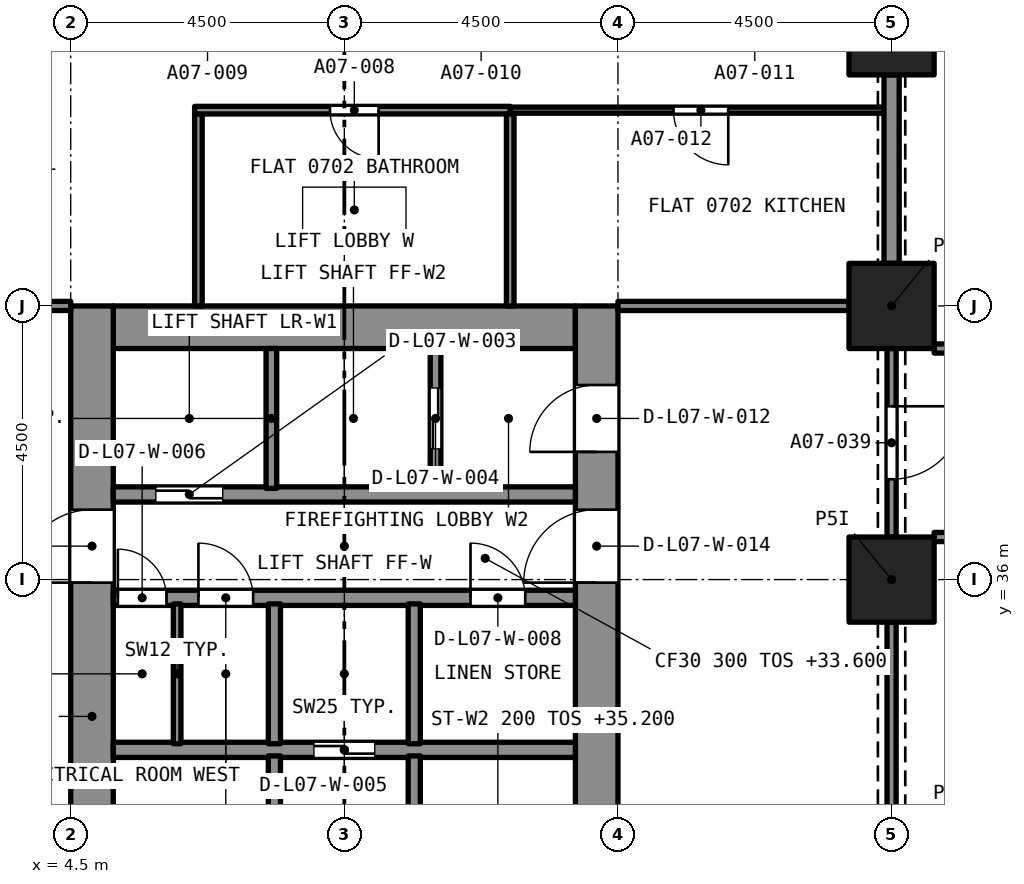
"""IFC4 building model, lengths in metres.
Left out: names, types, materials, properties, quantities, classifications, styles, units other than length and angle.
Written with IfcOpenShell. Run it as: python <this file> out.ifc"""

import sys

from ifc_helpers import new_model, si_unit, direction, frame, frame_2d, origin, origin_2d, place, context, subcontext, project, spatial, rectangle, extrude, element, fill, save


model = new_model("IFC4")
c1 = context("Model", 3, precision=1e-05, world=origin(), true_north=direction((0.0, 1.0)))
c2 = subcontext(c1, "Body", "Model", "MODEL_VIEW")
j1 = project(units=[si_unit("LENGTHUNIT", "METRE"), si_unit("PLANEANGLEUNIT", "RADIAN")], contexts=[c1])
p1 = place(None, origin())
s1 = spatial("IfcSite", under=j1, at=p1, CompositionType="ELEMENT")
p2 = place(p1, origin())
s2 = spatial("IfcBuilding", under=s1, at=p2, CompositionType="ELEMENT")
p3 = place(p2, frame((0.0, 0.0, 33.6)))
s3 = spatial("IfcBuildingStorey", under=s2, at=p3, CompositionType="ELEMENT", Elevation=33.6)
for number, where, z_axis, x_axis in (
    (1, (18.0, 36.0, 0.0), (0.0, 0.0, 1.0), (1.0, 0.0, 0.0)),
    (2, (18.0, 40.5, 0.0), (0.0, 0.0, 1.0), (1.0, 0.0, 0.0)),
    (3, (18.0, 45.0, 0.0), (0.0, 0.0, 1.0), (1.0, 0.0, 0.0)),
):
    element("IfcColumn", number, at=place(p3, frame(where, z_axis=z_axis, x_axis=x_axis)), inside=s3, PredefinedType="COLUMN", context=c2, shape_type="SweptSolid", body=[
        extrude(rectangle(XDim=1.4, YDim=1.4, at=origin_2d()), origin(), (0.0, 0.0, 1.0), 3.2),
    ])
p4 = place(p3, frame((5.2, 40.15, 0.0), z_axis=(0.0, 0.0, 1.0), x_axis=(1.0, 0.0, 0.0)))
e4 = element("IfcWall", 4, at=p4, inside=s3, PredefinedType="SOLIDWALL", context=c2, shape_type="SweptSolid", body=[
    extrude(rectangle(XDim=7.6, YDim=0.7, at=frame_2d((3.8, 0.0))), origin(), (0.0, 0.0, 1.0), 3.2),
])
p5 = place(p3, frame((4.85, 27.0, 0.0), z_axis=(0.0, 0.0, 1.0), x_axis=(0.0, 1.0, 0.0)))
e5 = element("IfcWall", 5, at=p5, inside=s3, PredefinedType="SOLIDWALL", context=c2, shape_type="SweptSolid", body=[
    extrude(rectangle(XDim=13.5, YDim=0.7, at=frame_2d((6.75, 0.0))), origin(), (0.0, 0.0, 1.0), 3.2),
])
p6 = place(p5, frame((8.95, 0.0, 0.0)))
e6 = element("IfcOpeningElement", 6, at=p6, cuts=e5, PredefinedType="OPENING", context=c2, shape_type="SweptSolid", body=[
    extrude(rectangle(XDim=1.2, YDim=2.1, at=frame_2d((0.6, 1.05))), frame((0.0, 0.36, 0.0), z_axis=(0.0, -1.0, 0.0), x_axis=(1.0, 0.0, 0.0)), (0.0, 0.0, 1.0), 0.72),
])
p7 = place(p3, frame((13.15, 27.0, 0.0), z_axis=(0.0, 0.0, 1.0), x_axis=(0.0, 1.0, 0.0)))
e7 = element("IfcWall", 7, at=p7, inside=s3, PredefinedType="SOLIDWALL", context=c2, shape_type="SweptSolid", body=[
    extrude(rectangle(XDim=13.5, YDim=0.7, at=frame_2d((6.75, 0.0))), origin(), (0.0, 0.0, 1.0), 3.2),
])
p8 = place(p7, frame((11.1, 0.0, 0.0)))
e8 = element("IfcOpeningElement", 8, at=p8, cuts=e7, PredefinedType="OPENING", context=c2, shape_type="SweptSolid", body=[
    extrude(rectangle(XDim=1.1, YDim=2.1, at=frame_2d((0.55, 1.05))), frame((0.0, 0.36, 0.0), z_axis=(0.0, -1.0, 0.0), x_axis=(1.0, 0.0, 0.0)), (0.0, 0.0, 1.0), 0.72),
])
p9 = place(p7, frame((8.95, 0.0, 0.0)))
e9 = element("IfcOpeningElement", 9, at=p9, cuts=e7, PredefinedType="OPENING", context=c2, shape_type="SweptSolid", body=[
    extrude(rectangle(XDim=1.2, YDim=2.1, at=frame_2d((0.6, 1.05))), frame((0.0, 0.36, 0.0), z_axis=(0.0, -1.0, 0.0), x_axis=(1.0, 0.0, 0.0)), (0.0, 0.0, 1.0), 0.72),
])
p10 = place(p3, frame((6.6, 40.5, 0.0), z_axis=(0.0, 0.0, 1.0), x_axis=(0.0, 1.0, 0.0)))
e10 = element("IfcWall", 10, at=p10, inside=s3, PredefinedType="PARTITIONING", context=c2, shape_type="SweptSolid", body=[
    extrude(rectangle(XDim=3.157, YDim=0.125, at=frame_2d((1.579, 0.0))), origin(), (0.0, 0.0, 1.0), 2.9),
])
p11 = place(p3, frame((11.728, 43.72, 0.0), z_axis=(0.0, 0.0, 1.0), x_axis=(-1.0, 0.0, 0.0)))
e11 = element("IfcWall", 11, at=p11, inside=s3, PredefinedType="PARTITIONING", context=c2, shape_type="SweptSolid", body=[
    extrude(rectangle(XDim=5.19, YDim=0.125, at=frame_2d((2.595, 0.0))), origin(), (0.0, 0.0, 1.0), 2.9),
])
p12 = place(p11, frame((2.164, 0.0, 0.0)))
e12 = element("IfcOpeningElement", 12, at=p12, cuts=e11, PredefinedType="OPENING", context=c2, shape_type="SweptSolid", body=[
    extrude(rectangle(XDim=0.8, YDim=2.1, at=frame_2d((0.4, 1.05))), frame((0.0, 0.073, 0.0), z_axis=(0.0, -1.0, 0.0), x_axis=(1.0, 0.0, 0.0)), (0.0, 0.0, 1.0), 0.145),
])
p13 = place(p3, frame((11.728, 40.5, 0.0), z_axis=(0.0, 0.0, 1.0), x_axis=(0.0, 1.0, 0.0)))
e13 = element("IfcWall", 13, at=p13, inside=s3, PredefinedType="PARTITIONING", context=c2, shape_type="SweptSolid", body=[
    extrude(rectangle(XDim=3.157, YDim=0.125, at=frame_2d((1.579, 0.0))), origin(), (0.0, 0.0, 1.0), 2.9),
])
p14 = place(p3, frame((17.875, 43.72, 0.0), z_axis=(0.0, 0.0, 1.0), x_axis=(-1.0, 0.0, 0.0)))
e14 = element("IfcWall", 14, at=p14, inside=s3, PredefinedType="PARTITIONING", context=c2, shape_type="SweptSolid", body=[
    extrude(rectangle(XDim=6.147, YDim=0.1, at=frame_2d((3.073, 0.0))), origin(), (0.0, 0.0, 1.0), 2.9),
])
p15 = place(p14, frame((2.561, 0.0, 0.0)))
e15 = element("IfcOpeningElement", 15, at=p15, cuts=e14, PredefinedType="OPENING", context=c2, shape_type="SweptSolid", body=[
    extrude(rectangle(XDim=0.9, YDim=2.1, at=frame_2d((0.45, 1.05))), frame((0.0, 0.06, 0.0), z_axis=(0.0, -1.0, 0.0), x_axis=(1.0, 0.0, 0.0)), (0.0, 0.0, 1.0), 0.12),
])
p16 = place(p3, frame((0.7, 40.5, 0.0), z_axis=(0.0, 0.0, 1.0), x_axis=(1.0, 0.0, 0.0)))
e16 = element("IfcWall", 16, at=p16, inside=s3, PredefinedType="PARTITIONING", context=c2, shape_type="SweptSolid", body=[
    extrude(rectangle(XDim=3.8, YDim=0.15, at=frame_2d((1.9, 0.0))), origin(), (0.0, 0.0, 1.0), 2.9),
])
p17 = place(p16, frame((1.05, 0.0, 0.0)))
e17 = element("IfcOpeningElement", 17, at=p17, cuts=e16, PredefinedType="OPENING", context=c2, shape_type="SweptSolid", body=[
    extrude(rectangle(XDim=1.0, YDim=2.1, at=frame_2d((0.5, 1.05))), frame((0.0, 0.085, 0.0), z_axis=(0.0, -1.0, 0.0), x_axis=(1.0, 0.0, 0.0)), (0.0, 0.0, 1.0), 0.17),
])
p18 = place(p3, frame((18.0, 41.2, 0.0), z_axis=(0.0, 0.0, 1.0), x_axis=(0.0, 1.0, 0.0)))
e18 = element("IfcWall", 18, at=p18, inside=s3, PredefinedType="PARTITIONING", context=c2, shape_type="SweptSolid", body=[
    extrude(rectangle(XDim=3.1, YDim=0.25, at=frame_2d((1.55, 0.0))), origin(), (0.0, 0.0, 1.0), 2.38),
])
p19 = place(p3, frame((13.5, 40.5, 0.0), z_axis=(0.0, 0.0, 1.0), x_axis=(1.0, 0.0, 0.0)))
e19 = element("IfcWall", 19, at=p19, inside=s3, PredefinedType="PARTITIONING", context=c2, shape_type="SweptSolid", body=[
    extrude(rectangle(XDim=3.8, YDim=0.15, at=frame_2d((1.9, 0.0))), origin(), (0.0, 0.0, 1.0), 2.9),
])
p20 = place(p3, frame((18.7, 39.8, 0.0), z_axis=(0.0, 0.0, 1.0), x_axis=(1.0, 0.0, 0.0)))
e20 = element("IfcWall", 20, at=p20, inside=s3, PredefinedType="PARTITIONING", context=c2, shape_type="SweptSolid", body=[
    extrude(rectangle(XDim=12.1, YDim=0.15, at=frame_2d((6.05, 0.0))), origin(), (0.0, 0.0, 1.0), 2.75),
])
p21 = place(p20, frame((5.55, 0.0, 0.0)))
e21 = element("IfcOpeningElement", 21, at=p21, cuts=e20, PredefinedType="OPENING", context=c2, shape_type="SweptSolid", body=[
    extrude(rectangle(XDim=1.0, YDim=2.1, at=frame_2d((0.5, 1.05))), frame((0.0, 0.085, 0.0), z_axis=(0.0, -1.0, 0.0), x_axis=(1.0, 0.0, 0.0)), (0.0, 0.0, 1.0), 0.17),
])
p22 = place(p3, frame((24.75, 36.7, 0.0), z_axis=(0.0, 0.0, 1.0), x_axis=(-1.0, 0.0, 0.0)))
e22 = element("IfcWall", 22, at=p22, inside=s3, PredefinedType="PARTITIONING", context=c2, shape_type="SweptSolid", body=[
    extrude(rectangle(XDim=6.05, YDim=0.15, at=frame_2d((3.025, 0.0))), origin(), (0.0, 0.0, 1.0), 2.75),
])
p23 = place(p22, frame((2.875, 0.0, 0.0)))
e23 = element("IfcOpeningElement", 23, at=p23, cuts=e22, PredefinedType="OPENING", context=c2, shape_type="SweptSolid", body=[
    extrude(rectangle(XDim=1.0, YDim=2.1, at=frame_2d((0.5, 1.05))), frame((0.0, 0.085, 0.0), z_axis=(0.0, -1.0, 0.0), x_axis=(1.0, 0.0, 0.0)), (0.0, 0.0, 1.0), 0.17),
])
p24 = place(p3, frame((18.0, 39.8, 0.0), z_axis=(0.0, 0.0, 1.0), x_axis=(0.0, -1.0, 0.0)))
e24 = element("IfcWall", 24, at=p24, inside=s3, PredefinedType="PARTITIONING", context=c2, shape_type="SweptSolid", body=[
    extrude(rectangle(XDim=3.1, YDim=0.15, at=frame_2d((1.55, 0.0))), origin(), (0.0, 0.0, 1.0), 2.38),
])
p25 = place(p24, frame((0.95, 0.0, 0.0)))
e25 = element("IfcOpeningElement", 25, at=p25, cuts=e24, PredefinedType="OPENING", context=c2, shape_type="SweptSolid", body=[
    extrude(rectangle(XDim=1.2, YDim=2.1, at=frame_2d((0.6, 1.05))), frame((0.0, 0.085, 0.0), z_axis=(0.0, -1.0, 0.0), x_axis=(1.0, 0.0, 0.0)), (0.0, 0.0, 1.0), 0.17),
])
p26 = place(p3, frame((18.0, 32.2, 0.0), z_axis=(0.0, 0.0, 1.0), x_axis=(0.0, 1.0, 0.0)))
e26 = element("IfcWall", 26, at=p26, inside=s3, PredefinedType="PARTITIONING", context=c2, shape_type="SweptSolid", body=[
    extrude(rectangle(XDim=3.1, YDim=0.15, at=frame_2d((1.55, 0.0))), origin(), (0.0, 0.0, 1.0), 2.38),
])
p27 = place(p3, frame((5.2, 33.2, 0.0), z_axis=(0.0, 0.0, 1.0), x_axis=(1.0, 0.0, 0.0)))
e27 = element("IfcWall", 27, at=p27, inside=s3, PredefinedType="SOLIDWALL", context=c2, shape_type="SweptSolid", body=[
    extrude(rectangle(XDim=7.6, YDim=0.25, at=frame_2d((3.8, 0.0))), origin(), (0.0, 0.0, 1.0), 2.9),
])
p28 = place(p27, frame((3.3, 0.0, 0.0)))
e28 = element("IfcOpeningElement", 28, at=p28, cuts=e27, PredefinedType="OPENING", context=c2, shape_type="SweptSolid", body=[
    extrude(rectangle(XDim=1.0, YDim=2.1, at=frame_2d((0.5, 1.05))), frame((0.0, 0.135, 0.0), z_axis=(0.0, -1.0, 0.0), x_axis=(1.0, 0.0, 0.0)), (0.0, 0.0, 1.0), 0.27),
])
p29 = place(p3, frame((5.2, 35.7, 0.0), z_axis=(0.0, 0.0, 1.0), x_axis=(1.0, 0.0, 0.0)))
e29 = element("IfcWall", 29, at=p29, inside=s3, PredefinedType="SOLIDWALL", context=c2, shape_type="SweptSolid", body=[
    extrude(rectangle(XDim=7.6, YDim=0.25, at=frame_2d((3.8, 0.0))), origin(), (0.0, 0.0, 1.0), 2.9),
])
p30 = place(p29, frame((0.075, 0.0, 0.0)))
e30 = element("IfcOpeningElement", 30, at=p30, cuts=e29, PredefinedType="OPENING", context=c2, shape_type="SweptSolid", body=[
    extrude(rectangle(XDim=0.8, YDim=2.1, at=frame_2d((0.4, 1.05))), frame((0.0, 0.135, 0.0), z_axis=(0.0, -1.0, 0.0), x_axis=(1.0, 0.0, 0.0)), (0.0, 0.0, 1.0), 0.27),
])
p31 = place(p29, frame((1.4, 0.0, 0.0)))
e31 = element("IfcOpeningElement", 31, at=p31, cuts=e29, PredefinedType="OPENING", context=c2, shape_type="SweptSolid", body=[
    extrude(rectangle(XDim=0.9, YDim=2.1, at=frame_2d((0.45, 1.05))), frame((0.0, 0.135, 0.0), z_axis=(0.0, -1.0, 0.0), x_axis=(1.0, 0.0, 0.0)), (0.0, 0.0, 1.0), 0.27),
])
p32 = place(p29, frame((5.875, 0.0, 0.0)))
e32 = element("IfcOpeningElement", 32, at=p32, cuts=e29, PredefinedType="OPENING", context=c2, shape_type="SweptSolid", body=[
    extrude(rectangle(XDim=0.9, YDim=2.1, at=frame_2d((0.45, 1.05))), frame((0.0, 0.135, 0.0), z_axis=(0.0, -1.0, 0.0), x_axis=(1.0, 0.0, 0.0)), (0.0, 0.0, 1.0), 0.27),
])
p33 = place(p3, frame((5.2, 37.4, 0.0), z_axis=(0.0, 0.0, 1.0), x_axis=(1.0, 0.0, 0.0)))
e33 = element("IfcWall", 33, at=p33, inside=s3, PredefinedType="SOLIDWALL", context=c2, shape_type="SweptSolid", body=[
    extrude(rectangle(XDim=7.6, YDim=0.25, at=frame_2d((3.8, 0.0))), origin(), (0.0, 0.0, 1.0), 2.9),
])
p34 = place(p33, frame((0.7, 0.0, 0.0)))
e34 = element("IfcOpeningElement", 34, at=p34, cuts=e33, PredefinedType="OPENING", context=c2, shape_type="SweptSolid", body=[
    extrude(rectangle(XDim=1.1, YDim=2.4, at=frame_2d((0.55, 1.2))), frame((0.0, 0.135, 0.0), z_axis=(0.0, -1.0, 0.0), x_axis=(1.0, 0.0, 0.0)), (0.0, 0.0, 1.0), 0.27),
])
p35 = place(p3, frame((7.85, 27.7, 0.0), z_axis=(0.0, 0.0, 1.0), x_axis=(0.0, 1.0, 0.0)))
e35 = element("IfcWall", 35, at=p35, inside=s3, PredefinedType="SOLIDWALL", context=c2, shape_type="SweptSolid", body=[
    extrude(rectangle(XDim=5.4, YDim=0.2, at=frame_2d((2.7, 0.0))), origin(), (0.0, 0.0, 1.0), 2.9),
])
p36 = place(p35, frame((0.2, 0.0, 0.0)))
e36 = element("IfcOpeningElement", 36, at=p36, cuts=e35, PredefinedType="OPENING", context=c2, shape_type="SweptSolid", body=[
    extrude(rectangle(XDim=0.9, YDim=2.1, at=frame_2d((0.45, 1.05))), frame((0.0, 0.11, 0.0), z_axis=(0.0, -1.0, 0.0), x_axis=(1.0, 0.0, 0.0)), (0.0, 0.0, 1.0), 0.22),
])
p37 = place(p3, frame((10.15, 27.7, 0.0), z_axis=(0.0, 0.0, 1.0), x_axis=(0.0, 1.0, 0.0)))
e37 = element("IfcWall", 37, at=p37, inside=s3, PredefinedType="SOLIDWALL", context=c2, shape_type="SweptSolid", body=[
    extrude(rectangle(XDim=5.4, YDim=0.2, at=frame_2d((2.7, 0.0))), origin(), (0.0, 0.0, 1.0), 2.9),
])
p38 = place(p37, frame((0.2, 0.0, 0.0)))
e38 = element("IfcOpeningElement", 38, at=p38, cuts=e37, PredefinedType="OPENING", context=c2, shape_type="SweptSolid", body=[
    extrude(rectangle(XDim=0.9, YDim=2.1, at=frame_2d((0.45, 1.05))), frame((0.0, 0.11, 0.0), z_axis=(0.0, -1.0, 0.0), x_axis=(1.0, 0.0, 0.0)), (0.0, 0.0, 1.0), 0.22),
])
for number, where, z_axis, x_axis in (
    (39, (7.85, 33.3, 0.0), (0.0, 0.0, 1.0), (0.0, 1.0, 0.0)),
    (40, (10.15, 33.3, 0.0), (0.0, 0.0, 1.0), (0.0, 1.0, 0.0)),
):
    element("IfcWall", number, at=place(p3, frame(where, z_axis=z_axis, x_axis=x_axis)), inside=s3, PredefinedType="SOLIDWALL", context=c2, shape_type="SweptSolid", body=[
        extrude(rectangle(XDim=2.3, YDim=0.2, at=frame_2d((1.15, 0.0))), origin(), (0.0, 0.0, 1.0), 2.9),
    ])
p39 = place(p3, frame((7.8, 37.5, 0.0), z_axis=(0.0, 0.0, 1.0), x_axis=(0.0, 1.0, 0.0)))
e41 = element("IfcWall", 41, at=p39, inside=s3, PredefinedType="SOLIDWALL", context=c2, shape_type="SweptSolid", body=[
    extrude(rectangle(XDim=2.3, YDim=0.175, at=frame_2d((1.15, 0.0))), origin(), (0.0, 0.0, 1.0), 2.9),
])
p40 = place(p3, frame((10.5, 37.5, 0.0), z_axis=(0.0, 0.0, 1.0), x_axis=(0.0, 1.0, 0.0)))
e42 = element("IfcWall", 42, at=p40, inside=s3, PredefinedType="SOLIDWALL", context=c2, shape_type="SweptSolid", body=[
    extrude(rectangle(XDim=2.3, YDim=0.175, at=frame_2d((1.15, 0.0))), origin(), (0.0, 0.0, 1.0), 2.9),
])
p41 = place(p40, frame((0.65, 0.0, 0.0)))
e43 = element("IfcOpeningElement", 43, at=p41, cuts=e42, PredefinedType="OPENING", context=c2, shape_type="SweptSolid", body=[
    extrude(rectangle(XDim=1.0, YDim=2.1, at=frame_2d((0.5, 1.05))), frame((0.0, 0.097, 0.0), z_axis=(0.0, -1.0, 0.0), x_axis=(1.0, 0.0, 0.0)), (0.0, 0.0, 1.0), 0.195),
])
p42 = place(p3, frame((6.25, 33.3, 0.0), z_axis=(0.0, 0.0, 1.0), x_axis=(0.0, 1.0, 0.0)))
e44 = element("IfcWall", 44, at=p42, inside=s3, PredefinedType="PARTITIONING", context=c2, shape_type="SweptSolid", body=[
    extrude(rectangle(XDim=2.3, YDim=0.125, at=frame_2d((1.15, 0.0))), origin(), (0.0, 0.0, 1.0), 2.9),
])
p43 = place(p12, origin())
e45 = element("IfcDoor", 45, at=p43, inside=s3, OperationType="SINGLE_SWING_LEFT", PredefinedType="DOOR", context=c2, shape_type="SweptSolid", body=[
    extrude(rectangle(XDim=0.8, YDim=2.1, at=frame_2d((0.4, 1.05))), frame((0.0, 0.025, 0.0), z_axis=(0.0, -1.0, 0.0), x_axis=(1.0, 0.0, 0.0)), (0.0, 0.0, 1.0), 0.05),
])
fill(e12, e45)
p44 = place(p15, origin())
e46 = element("IfcDoor", 46, at=p44, inside=s3, OperationType="SINGLE_SWING_LEFT", PredefinedType="DOOR", context=c2, shape_type="SweptSolid", body=[
    extrude(rectangle(XDim=0.9, YDim=2.1, at=frame_2d((0.45, 1.05))), frame((0.0, 0.025, 0.0), z_axis=(0.0, -1.0, 0.0), x_axis=(1.0, 0.0, 0.0)), (0.0, 0.0, 1.0), 0.05),
])
fill(e15, e46)
p45 = place(p25, origin())
e47 = element("IfcDoor", 47, at=p45, inside=s3, OperationType="SINGLE_SWING_LEFT", PredefinedType="DOOR", context=c2, shape_type="SweptSolid", body=[
    extrude(rectangle(XDim=1.2, YDim=2.1, at=frame_2d((0.6, 1.05))), frame((0.0, 0.025, 0.0), z_axis=(0.0, -1.0, 0.0), x_axis=(1.0, 0.0, 0.0)), (0.0, 0.0, 1.0), 0.05),
])
fill(e25, e47)
p46 = place(p34, origin())
e48 = element("IfcDoor", 48, at=p46, inside=s3, OperationType="SLIDING_TO_LEFT", PredefinedType="DOOR", context=c2, shape_type="SweptSolid", body=[
    extrude(rectangle(XDim=1.1, YDim=2.4, at=frame_2d((0.55, 1.2))), frame((0.0, 0.025, 0.0), z_axis=(0.0, -1.0, 0.0), x_axis=(1.0, 0.0, 0.0)), (0.0, 0.0, 1.0), 0.05),
])
fill(e34, e48)
p47 = place(p41, origin())
e49 = element("IfcDoor", 49, at=p47, inside=s3, OperationType="SLIDING_TO_LEFT", PredefinedType="DOOR", context=c2, shape_type="SweptSolid", body=[
    extrude(rectangle(XDim=1.0, YDim=2.1, at=frame_2d((0.5, 1.05))), frame((0.0, 0.025, 0.0), z_axis=(0.0, -1.0, 0.0), x_axis=(1.0, 0.0, 0.0)), (0.0, 0.0, 1.0), 0.05),
])
fill(e43, e49)
p48 = place(p28, origin())
e50 = element("IfcDoor", 50, at=p48, inside=s3, OperationType="SLIDING_TO_LEFT", PredefinedType="DOOR", context=c2, shape_type="SweptSolid", body=[
    extrude(rectangle(XDim=1.0, YDim=2.1, at=frame_2d((0.5, 1.05))), frame((0.0, 0.025, 0.0), z_axis=(0.0, -1.0, 0.0), x_axis=(1.0, 0.0, 0.0)), (0.0, 0.0, 1.0), 0.05),
])
fill(e28, e50)
p49 = place(p30, origin())
e51 = element("IfcDoor", 51, at=p49, inside=s3, OperationType="SINGLE_SWING_LEFT", PredefinedType="DOOR", context=c2, shape_type="SweptSolid", body=[
    extrude(rectangle(XDim=0.8, YDim=2.1, at=frame_2d((0.4, 1.05))), frame((0.0, 0.025, 0.0), z_axis=(0.0, -1.0, 0.0), x_axis=(1.0, 0.0, 0.0)), (0.0, 0.0, 1.0), 0.05),
])
fill(e30, e51)
p50 = place(p31, origin())
e52 = element("IfcDoor", 52, at=p50, inside=s3, OperationType="SINGLE_SWING_LEFT", PredefinedType="DOOR", context=c2, shape_type="SweptSolid", body=[
    extrude(rectangle(XDim=0.9, YDim=2.1, at=frame_2d((0.45, 1.05))), frame((0.0, 0.025, 0.0), z_axis=(0.0, -1.0, 0.0), x_axis=(1.0, 0.0, 0.0)), (0.0, 0.0, 1.0), 0.05),
])
fill(e31, e52)
p51 = place(p32, origin())
e53 = element("IfcDoor", 53, at=p51, inside=s3, OperationType="SINGLE_SWING_LEFT", PredefinedType="DOOR", context=c2, shape_type="SweptSolid", body=[
    extrude(rectangle(XDim=0.9, YDim=2.1, at=frame_2d((0.45, 1.05))), frame((0.0, 0.025, 0.0), z_axis=(0.0, -1.0, 0.0), x_axis=(1.0, 0.0, 0.0)), (0.0, 0.0, 1.0), 0.05),
])
fill(e32, e53)
p52 = place(p8, origin())
e54 = element("IfcDoor", 54, at=p52, inside=s3, OperationType="SINGLE_SWING_LEFT", PredefinedType="DOOR", context=c2, shape_type="SweptSolid", body=[
    extrude(rectangle(XDim=1.1, YDim=2.1, at=frame_2d((0.55, 1.05))), frame((0.0, 0.025, 0.0), z_axis=(0.0, -1.0, 0.0), x_axis=(1.0, 0.0, 0.0)), (0.0, 0.0, 1.0), 0.05),
])
fill(e8, e54)
p53 = place(p6, origin())
e55 = element("IfcDoor", 55, at=p53, inside=s3, OperationType="SINGLE_SWING_LEFT", PredefinedType="DOOR", context=c2, shape_type="SweptSolid", body=[
    extrude(rectangle(XDim=1.2, YDim=2.1, at=frame_2d((0.6, 1.05))), frame((0.0, 0.025, 0.0), z_axis=(0.0, -1.0, 0.0), x_axis=(1.0, 0.0, 0.0)), (0.0, 0.0, 1.0), 0.05),
])
fill(e6, e55)
p54 = place(p9, origin())
e56 = element("IfcDoor", 56, at=p54, inside=s3, OperationType="SINGLE_SWING_LEFT", PredefinedType="DOOR", context=c2, shape_type="SweptSolid", body=[
    extrude(rectangle(XDim=1.2, YDim=2.1, at=frame_2d((0.6, 1.05))), frame((0.0, 0.025, 0.0), z_axis=(0.0, -1.0, 0.0), x_axis=(1.0, 0.0, 0.0)), (0.0, 0.0, 1.0), 0.05),
])
fill(e9, e56)
save(model, sys.argv[1])
